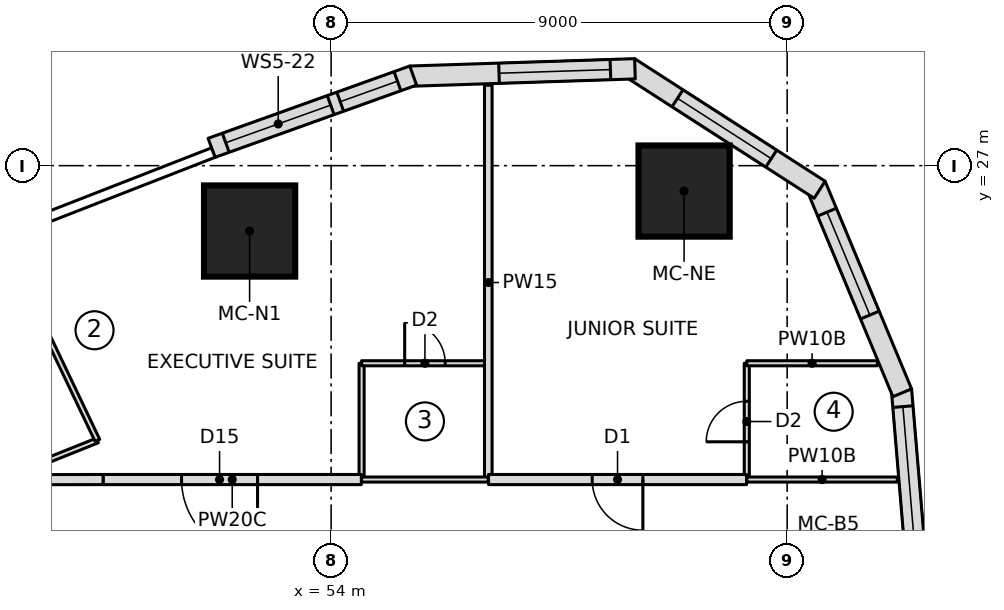
"""IFC4 building model, lengths in metres.
Left out: names, types, materials, properties, quantities, classifications, styles, units other than length and angle.
Written with IfcOpenShell. Run it as: python <this file> out.ifc"""

import sys

from ifc_helpers import new_model, si_unit, direction, frame, frame_2d, origin, origin_2d, place, context, subcontext, project, spatial, polyline, rectangle, outline, extrude, element, fill, save


model = new_model("IFC4")
c1 = context("Model", 3, precision=1e-05, world=origin(), true_north=direction((0.0, 1.0)))
c2 = subcontext(c1, "Body", "Model", "MODEL_VIEW")
j1 = project(units=[si_unit("LENGTHUNIT", "METRE"), si_unit("PLANEANGLEUNIT", "RADIAN")], contexts=[c1])
p1 = place(None, origin())
s1 = spatial("IfcSite", under=j1, at=p1, CompositionType="ELEMENT")
p2 = place(p1, origin())
s2 = spatial("IfcBuilding", under=s1, at=p2, CompositionType="ELEMENT")
p3 = place(p2, frame((0.0, 0.0, 39.6)))
s3 = spatial("IfcBuildingStorey", under=s2, at=p3, CompositionType="ELEMENT", Elevation=39.6)
for number, where, z_axis, x_axis in (
    (1, (60.966, 26.499, 0.0), (0.0, 0.0, 1.0), (1.0, 0.0, 0.0)),
    (2, (52.392, 25.71, 0.0), (0.0, 0.0, 1.0), (1.0, 0.0, 0.0)),
):
    element("IfcColumn", number, at=place(p3, frame(where, z_axis=z_axis, x_axis=x_axis)), inside=s3, PredefinedType="COLUMN", context=c2, shape_type="SweptSolid", body=[
        extrude(rectangle(XDim=1.8, YDim=1.8, at=origin_2d()), origin(), (0.0, 0.0, 1.0), 3.55),
    ])
p4 = place(p3, frame((65.603, 18.455, 0.0), z_axis=(0.0, 0.0, 1.0), x_axis=(-0.083793550906, 0.996483136248, 0.0)))
e3 = element("IfcWall", 3, at=p4, inside=s3, PredefinedType="NOTDEFINED", context=c2, shape_type="SweptSolid", body=[
    extrude(outline(polyline([(-0.002, -0.2), (4.136, -0.2), (4.074, 0.2), (0.002, 0.2), (-0.002, -0.2)])), origin(), (0.0, 0.0, 1.0), 3.25),
])
p5 = place(p4, frame((0.302, 0.0, 0.9)))
e4 = element("IfcOpeningElement", 4, at=p5, cuts=e3, PredefinedType="OPENING", context=c2, shape_type="SweptSolid", body=[
    extrude(rectangle(XDim=3.5, YDim=1.8, at=frame_2d((1.75, 0.9))), frame((0.0, 0.21, 0.0), z_axis=(0.0, -1.0, 0.0), x_axis=(1.0, 0.0, 0.0)), (0.0, 0.0, 1.0), 0.42),
])
p6 = place(p3, frame((65.259, 22.546, 0.0), z_axis=(0.0, 0.0, 1.0), x_axis=(-0.384372042685, 0.923178277908, 0.0)))
e5 = element("IfcWall", 5, at=p6, inside=s3, PredefinedType="NOTDEFINED", context=c2, shape_type="SweptSolid", body=[
    extrude(outline(polyline([(-0.031, -0.2), (4.408, -0.2), (4.283, 0.2), (0.031, 0.2), (-0.031, -0.2)])), origin(), (0.0, 0.0, 1.0), 3.25),
])
p7 = place(p6, frame((1.631, 0.0, 0.6)))
e6 = element("IfcOpeningElement", 6, at=p7, cuts=e5, PredefinedType="OPENING", context=c2, shape_type="SweptSolid", body=[
    extrude(outline(polyline([(0.0, 1.35), (0.084, 1.771), (0.322, 2.128), (0.679, 2.366), (1.1, 2.45), (1.521, 2.366), (1.878, 2.128), (2.116, 1.771), (2.2, 1.35), (2.2, 1.1), (2.116, 0.679), (1.878, 0.322), (1.521, 0.084), (1.1, 0.0), (0.679, 0.084), (0.322, 0.322), (0.084, 0.679), (0.0, 1.1), (0.0, 1.35)])), frame((0.0, 0.21, 0.0), z_axis=(0.0, -1.0, 0.0), x_axis=(1.0, 0.0, 0.0)), (0.0, 0.0, 1.0), 0.42),
])
p8 = place(p3, frame((63.588, 26.558, 0.0), z_axis=(0.0, 0.0, 1.0), x_axis=(-0.840937468718, 0.541132307025, 0.0)))
e7 = element("IfcWall", 7, at=p8, inside=s3, PredefinedType="NOTDEFINED", context=c2, shape_type="SweptSolid", body=[
    extrude(outline(polyline([(-0.062, -0.2), (4.409, -0.2), (4.284, 0.2), (0.062, 0.2), (-0.062, -0.2)])), origin(), (0.0, 0.0, 1.0), 3.25),
])
p9 = place(p8, frame((1.073, 0.0, 0.6)))
e8 = element("IfcOpeningElement", 8, at=p9, cuts=e7, PredefinedType="OPENING", context=c2, shape_type="SweptSolid", body=[
    extrude(outline(polyline([(0.0, 1.35), (0.084, 1.771), (0.322, 2.128), (0.679, 2.366), (1.1, 2.45), (1.521, 2.366), (1.878, 2.128), (2.116, 1.771), (2.2, 1.35), (2.2, 1.1), (2.116, 0.679), (1.878, 0.322), (1.521, 0.084), (1.1, 0.0), (0.679, 0.084), (0.322, 0.322), (0.084, 0.679), (0.0, 1.1), (0.0, 1.35)])), frame((0.0, 0.21, 0.0), z_axis=(0.0, -1.0, 0.0), x_axis=(1.0, 0.0, 0.0)), (0.0, 0.0, 1.0), 0.42),
])
p10 = place(p3, frame((59.934, 28.91, 0.0), z_axis=(0.0, 0.0, 1.0), x_axis=(-0.999463576228, -0.032749958686, 0.0)))
e9 = element("IfcWall", 9, at=p10, inside=s3, PredefinedType="NOTDEFINED", context=c2, shape_type="SweptSolid", body=[
    extrude(outline(polyline([(-0.062, -0.2), (4.378, -0.2), (4.315, 0.2), (0.062, 0.2), (-0.062, -0.2)])), origin(), (0.0, 0.0, 1.0), 3.25),
])
p11 = place(p10, frame((0.422, 0.0, 0.6)))
e10 = element("IfcOpeningElement", 10, at=p11, cuts=e9, PredefinedType="OPENING", context=c2, shape_type="SweptSolid", body=[
    extrude(outline(polyline([(0.0, 1.35), (0.084, 1.771), (0.322, 2.128), (0.679, 2.366), (1.1, 2.45), (1.521, 2.366), (1.878, 2.128), (2.116, 1.771), (2.2, 1.35), (2.2, 1.1), (2.116, 0.679), (1.878, 0.322), (1.521, 0.084), (1.1, 0.0), (0.679, 0.084), (0.322, 0.322), (0.084, 0.679), (0.0, 1.1), (0.0, 1.35)])), frame((0.0, 0.21, 0.0), z_axis=(0.0, -1.0, 0.0), x_axis=(1.0, 0.0, 0.0)), (0.0, 0.0, 1.0), 0.42),
])
p12 = place(p3, frame((55.59, 28.768, 0.0), z_axis=(0.0, 0.0, 1.0), x_axis=(-0.941339752885, -0.337460323057, 0.0)))
e11 = element("IfcWall", 11, at=p12, inside=s3, PredefinedType="NOTDEFINED", context=c2, shape_type="SweptSolid", body=[
    extrude(outline(polyline([(-0.031, -0.2), (4.196, -0.2), (4.196, 0.2), (0.031, 0.2), (-0.031, -0.2)])), origin(), (0.0, 0.0, 1.0), 3.25),
])
p13 = place(p12, frame((0.298, 0.0, 0.9)))
e12 = element("IfcOpeningElement", 12, at=p13, cuts=e11, PredefinedType="OPENING", context=c2, shape_type="SweptSolid", body=[
    extrude(rectangle(XDim=1.2, YDim=1.8, at=frame_2d((0.6, 0.9))), frame((0.0, 0.21, 0.0), z_axis=(0.0, -1.0, 0.0), x_axis=(1.0, 0.0, 0.0)), (0.0, 0.0, 1.0), 0.42),
])
p14 = place(p12, frame((1.698, 0.0, 0.9)))
e13 = element("IfcOpeningElement", 13, at=p14, cuts=e11, PredefinedType="OPENING", context=c2, shape_type="SweptSolid", body=[
    extrude(rectangle(XDim=2.2, YDim=1.8, at=frame_2d((1.1, 0.9))), frame((0.0, 0.21, 0.0), z_axis=(0.0, -1.0, 0.0), x_axis=(1.0, 0.0, 0.0)), (0.0, 0.0, 1.0), 0.42),
])
p15 = place(p3, frame((54.602, 20.8, 0.0), z_axis=(0.0, 0.0, 1.0), x_axis=(0.0, 1.0, 0.0)))
e14 = element("IfcWall", 14, at=p15, inside=s3, PredefinedType="PARTITIONING", context=c2, shape_type="SweptSolid", body=[
    extrude(rectangle(XDim=2.3, YDim=0.1, at=frame_2d((1.15, 0.0))), origin(), (0.0, 0.0, 1.0), 3.25),
])
p16 = place(p3, frame((54.602, 23.1, 0.0), z_axis=(0.0, 0.0, 1.0), x_axis=(1.0, 0.0, 0.0)))
e15 = element("IfcWall", 15, at=p16, inside=s3, PredefinedType="PARTITIONING", context=c2, shape_type="SweptSolid", body=[
    extrude(rectangle(XDim=2.5, YDim=0.1, at=frame_2d((1.25, 0.0))), origin(), (0.0, 0.0, 1.0), 3.25),
])
p17 = place(p16, frame((0.85, 0.0, 0.0)))
e16 = element("IfcOpeningElement", 16, at=p17, cuts=e15, PredefinedType="OPENING", context=c2, shape_type="SweptSolid", body=[
    extrude(rectangle(XDim=0.8, YDim=2.1, at=frame_2d((0.4, 1.05))), frame((0.0, 0.06, 0.0), z_axis=(0.0, -1.0, 0.0), x_axis=(1.0, 0.0, 0.0)), (0.0, 0.0, 1.0), 0.12),
])
p18 = place(p3, frame((62.203, 20.8, 0.0), z_axis=(0.0, 0.0, 1.0), x_axis=(0.0, 1.0, 0.0)))
e17 = element("IfcWall", 17, at=p18, inside=s3, PredefinedType="PARTITIONING", context=c2, shape_type="SweptSolid", body=[
    extrude(rectangle(XDim=2.3, YDim=0.1, at=frame_2d((1.15, 0.0))), origin(), (0.0, 0.0, 1.0), 3.25),
])
p19 = place(p18, frame((0.75, 0.0, 0.0)))
e18 = element("IfcOpeningElement", 18, at=p19, cuts=e17, PredefinedType="OPENING", context=c2, shape_type="SweptSolid", body=[
    extrude(rectangle(XDim=0.8, YDim=2.1, at=frame_2d((0.4, 1.05))), frame((0.0, 0.06, 0.0), z_axis=(0.0, -1.0, 0.0), x_axis=(1.0, 0.0, 0.0)), (0.0, 0.0, 1.0), 0.12),
])
p20 = place(p3, frame((62.203, 23.1, 0.0), z_axis=(0.0, 0.0, 1.0), x_axis=(1.0, 0.0, 0.0)))
e19 = element("IfcWall", 19, at=p20, inside=s3, PredefinedType="PARTITIONING", context=c2, shape_type="SweptSolid", body=[
    extrude(rectangle(XDim=2.578, YDim=0.1, at=frame_2d((1.289, 0.0))), origin(), (0.0, 0.0, 1.0), 3.25),
])
p21 = place(p3, frame((57.102, 20.8, 0.0), z_axis=(0.0, 0.0, 1.0), x_axis=(0.0, 1.0, 0.0)))
e20 = element("IfcWall", 20, at=p21, inside=s3, PredefinedType="PARTITIONING", context=c2, shape_type="SweptSolid", body=[
    extrude(rectangle(XDim=7.787, YDim=0.15, at=frame_2d((3.894, 0.0))), origin(), (0.0, 0.0, 1.0), 3.25),
])
p22 = place(p3, frame((49.388, 21.577, 0.0), z_axis=(0.0, 0.0, 1.0), x_axis=(-0.928266690687, -0.371915247014, 0.0)))
e21 = element("IfcWall", 21, at=p22, inside=s3, PredefinedType="PARTITIONING", context=c2, shape_type="SweptSolid", body=[
    extrude(rectangle(XDim=2.487, YDim=0.1, at=frame_2d((1.244, 0.0))), origin(), (0.0, 0.0, 1.0), 3.25),
])
p23 = place(p3, frame((54.597, 20.805, 0.0), z_axis=(0.0, 0.0, 1.0), x_axis=(-1.0, 0.0, 0.0)))
e22 = element("IfcWall", 22, at=p23, inside=s3, PredefinedType="PARTITIONING", context=c2, shape_type="SweptSolid", body=[
    extrude(rectangle(XDim=5.097, YDim=0.2, at=frame_2d((2.548, 0.0))), origin(), (0.0, 0.0, 1.0), 3.25),
])
p24 = place(p23, frame((2.048, 0.0, 0.0)))
e23 = element("IfcOpeningElement", 23, at=p24, cuts=e22, PredefinedType="OPENING", context=c2, shape_type="SweptSolid", body=[
    extrude(rectangle(XDim=1.5, YDim=2.1, at=frame_2d((0.75, 1.05))), frame((0.0, 0.11, 0.0), z_axis=(0.0, -1.0, 0.0), x_axis=(1.0, 0.0, 0.0)), (0.0, 0.0, 1.0), 0.22),
])
p25 = place(p3, frame((62.198, 20.805, 0.0), z_axis=(0.0, 0.0, 1.0), x_axis=(-1.0, 0.0, 0.0)))
e24 = element("IfcWall", 24, at=p25, inside=s3, PredefinedType="PARTITIONING", context=c2, shape_type="SweptSolid", body=[
    extrude(rectangle(XDim=5.092, YDim=0.2, at=frame_2d((2.546, 0.0))), origin(), (0.0, 0.0, 1.0), 3.25),
])
p26 = place(p25, frame((2.046, 0.0, 0.0)))
e25 = element("IfcOpeningElement", 25, at=p26, cuts=e24, PredefinedType="OPENING", context=c2, shape_type="SweptSolid", body=[
    extrude(rectangle(XDim=1.0, YDim=2.1, at=frame_2d((0.5, 1.05))), frame((0.0, 0.11, 0.0), z_axis=(0.0, -1.0, 0.0), x_axis=(1.0, 0.0, 0.0)), (0.0, 0.0, 1.0), 0.22),
])
p27 = place(p3, frame((57.102, 20.805, 0.0), z_axis=(0.0, 0.0, 1.0), x_axis=(-1.0, 0.0, 0.0)))
e26 = element("IfcWall", 26, at=p27, inside=s3, PredefinedType="PARTITIONING", context=c2, shape_type="SweptSolid", body=[
    extrude(rectangle(XDim=2.5, YDim=0.1, at=frame_2d((1.25, 0.0))), origin(), (0.0, 0.0, 1.0), 3.25),
])
p28 = place(p3, frame((65.175, 20.805, 0.0), z_axis=(0.0, 0.0, 1.0), x_axis=(-1.0, 0.0, 0.0)))
e27 = element("IfcWall", 27, at=p28, inside=s3, PredefinedType="PARTITIONING", context=c2, shape_type="SweptSolid", body=[
    extrude(rectangle(XDim=2.971, YDim=0.1, at=frame_2d((1.486, 0.0))), origin(), (0.0, 0.0, 1.0), 3.25),
])
p29 = place(p3, frame((48.396, 23.657, 0.0), z_axis=(0.0, 0.0, 1.0), x_axis=(0.4306119303, -0.902537182327, 0.0)))
e28 = element("IfcWall", 28, at=p29, inside=s3, PredefinedType="PARTITIONING", context=c2, shape_type="SweptSolid", body=[
    extrude(rectangle(XDim=2.305, YDim=0.1, at=frame_2d((1.152, 0.0))), origin(), (0.0, 0.0, 1.0), 3.25),
])
p30 = place(p3, frame((49.5, 20.805, 0.0), z_axis=(0.0, 0.0, 1.0), x_axis=(-0.999998683182, -0.001622847587, 0.0)))
e29 = element("IfcWall", 29, at=p30, inside=s3, PredefinedType="PARTITIONING", context=c2, shape_type="SweptSolid", body=[
    extrude(rectangle(XDim=1.504, YDim=0.2, at=frame_2d((0.752, 0.0))), origin(), (0.0, 0.0, 1.0), 3.25),
])
p31 = place(p5, origin())
e30 = element("IfcWindow", 30, at=p31, inside=s3, PartitioningType="SINGLE_PANEL", PredefinedType="WINDOW", context=c2, shape_type="SweptSolid", body=[
    extrude(rectangle(XDim=3.5, YDim=1.8, at=frame_2d((1.75, 0.9))), frame((0.0, 0.17, 0.0), z_axis=(0.0, -1.0, 0.0), x_axis=(1.0, 0.0, 0.0)), (0.0, 0.0, 1.0), 0.06),
])
fill(e4, e30)
p32 = place(p7, origin())
e31 = element("IfcWindow", 31, at=p32, inside=s3, PartitioningType="SINGLE_PANEL", PredefinedType="WINDOW", context=c2, shape_type="SweptSolid", body=[
    extrude(outline(polyline([(0.0, 1.35), (0.084, 1.771), (0.322, 2.128), (0.679, 2.366), (1.1, 2.45), (1.521, 2.366), (1.878, 2.128), (2.116, 1.771), (2.2, 1.35), (2.2, 1.1), (2.116, 0.679), (1.878, 0.322), (1.521, 0.084), (1.1, 0.0), (0.679, 0.084), (0.322, 0.322), (0.084, 0.679), (0.0, 1.1), (0.0, 1.35)])), frame((0.0, 0.17, 0.0), z_axis=(0.0, -1.0, 0.0), x_axis=(1.0, 0.0, 0.0)), (0.0, 0.0, 1.0), 0.06),
])
fill(e6, e31)
p33 = place(p9, origin())
e32 = element("IfcWindow", 32, at=p33, inside=s3, PartitioningType="SINGLE_PANEL", PredefinedType="WINDOW", context=c2, shape_type="SweptSolid", body=[
    extrude(outline(polyline([(0.0, 1.35), (0.084, 1.771), (0.322, 2.128), (0.679, 2.366), (1.1, 2.45), (1.521, 2.366), (1.878, 2.128), (2.116, 1.771), (2.2, 1.35), (2.2, 1.1), (2.116, 0.679), (1.878, 0.322), (1.521, 0.084), (1.1, 0.0), (0.679, 0.084), (0.322, 0.322), (0.084, 0.679), (0.0, 1.1), (0.0, 1.35)])), frame((0.0, 0.17, 0.0), z_axis=(0.0, -1.0, 0.0), x_axis=(1.0, 0.0, 0.0)), (0.0, 0.0, 1.0), 0.06),
])
fill(e8, e32)
p34 = place(p11, origin())
e33 = element("IfcWindow", 33, at=p34, inside=s3, PartitioningType="SINGLE_PANEL", PredefinedType="WINDOW", context=c2, shape_type="SweptSolid", body=[
    extrude(outline(polyline([(0.0, 1.35), (0.084, 1.771), (0.322, 2.128), (0.679, 2.366), (1.1, 2.45), (1.521, 2.366), (1.878, 2.128), (2.116, 1.771), (2.2, 1.35), (2.2, 1.1), (2.116, 0.679), (1.878, 0.322), (1.521, 0.084), (1.1, 0.0), (0.679, 0.084), (0.322, 0.322), (0.084, 0.679), (0.0, 1.1), (0.0, 1.35)])), frame((0.0, 0.17, 0.0), z_axis=(0.0, -1.0, 0.0), x_axis=(1.0, 0.0, 0.0)), (0.0, 0.0, 1.0), 0.06),
])
fill(e10, e33)
p35 = place(p13, origin())
e34 = element("IfcWindow", 34, at=p35, inside=s3, PartitioningType="SINGLE_PANEL", PredefinedType="WINDOW", context=c2, shape_type="SweptSolid", body=[
    extrude(rectangle(XDim=1.2, YDim=1.8, at=frame_2d((0.6, 0.9))), frame((0.0, 0.17, 0.0), z_axis=(0.0, -1.0, 0.0), x_axis=(1.0, 0.0, 0.0)), (0.0, 0.0, 1.0), 0.06),
])
fill(e12, e34)
p36 = place(p14, origin())
e35 = element("IfcWindow", 35, at=p36, inside=s3, PartitioningType="SINGLE_PANEL", PredefinedType="WINDOW", context=c2, shape_type="SweptSolid", body=[
    extrude(rectangle(XDim=2.2, YDim=1.8, at=frame_2d((1.1, 0.9))), frame((0.0, 0.17, 0.0), z_axis=(0.0, -1.0, 0.0), x_axis=(1.0, 0.0, 0.0)), (0.0, 0.0, 1.0), 0.06),
])
fill(e13, e35)
p37 = place(p17, origin())
e36 = element("IfcDoor", 36, at=p37, inside=s3, OperationType="SINGLE_SWING_LEFT", PredefinedType="DOOR", context=c2, shape_type="SweptSolid", body=[
    extrude(rectangle(XDim=0.8, YDim=2.1, at=frame_2d((0.4, 1.05))), frame((0.0, 0.025, 0.0), z_axis=(0.0, -1.0, 0.0), x_axis=(1.0, 0.0, 0.0)), (0.0, 0.0, 1.0), 0.05),
])
fill(e16, e36)
p38 = place(p19, origin())
e37 = element("IfcDoor", 37, at=p38, inside=s3, OperationType="SINGLE_SWING_LEFT", PredefinedType="DOOR", context=c2, shape_type="SweptSolid", body=[
    extrude(rectangle(XDim=0.8, YDim=2.1, at=frame_2d((0.4, 1.05))), frame((0.0, 0.025, 0.0), z_axis=(0.0, -1.0, 0.0), x_axis=(1.0, 0.0, 0.0)), (0.0, 0.0, 1.0), 0.05),
])
fill(e18, e37)
p39 = place(p24, origin())
e38 = element("IfcDoor", 38, at=p39, inside=s3, OperationType="DOUBLE_DOOR_SINGLE_SWING", PredefinedType="DOOR", context=c2, shape_type="SweptSolid", body=[
    extrude(rectangle(XDim=1.5, YDim=2.1, at=frame_2d((0.75, 1.05))), frame((0.0, 0.025, 0.0), z_axis=(0.0, -1.0, 0.0), x_axis=(1.0, 0.0, 0.0)), (0.0, 0.0, 1.0), 0.05),
])
fill(e23, e38)
p40 = place(p26, origin())
e39 = element("IfcDoor", 39, at=p40, inside=s3, OperationType="SINGLE_SWING_LEFT", PredefinedType="DOOR", context=c2, shape_type="SweptSolid", body=[
    extrude(rectangle(XDim=1.0, YDim=2.1, at=frame_2d((0.5, 1.05))), frame((0.0, 0.025, 0.0), z_axis=(0.0, -1.0, 0.0), x_axis=(1.0, 0.0, 0.0)), (0.0, 0.0, 1.0), 0.05),
])
fill(e25, e39)
save(model, sys.argv[1])
